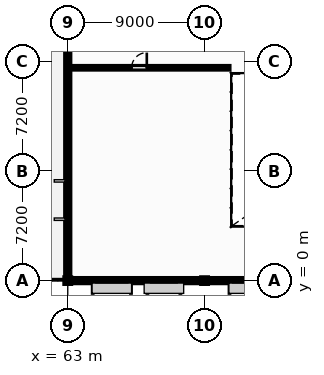
"""IFC4 building model, lengths in metres.
Left out: names, types, materials, properties, quantities, classifications, styles, units other than length and angle.
Written with IfcOpenShell. Run it as: python <this file> out.ifc"""

import sys

from ifc_helpers import new_model, si_unit, direction, frame, frame_2d, origin, origin_2d, place, context, subcontext, project, spatial, polyline, rectangle, i_section, outline, extrude, element, fill, save


model = new_model("IFC4")
c1 = context("Model", 3, precision=1e-05, world=origin(), true_north=direction((0.0, 1.0)))
c2 = subcontext(c1, "Body", "Model", "MODEL_VIEW")
j1 = project(units=[si_unit("LENGTHUNIT", "METRE"), si_unit("PLANEANGLEUNIT", "RADIAN")], contexts=[c1])
p1 = place(None, origin())
s1 = spatial("IfcSite", under=j1, at=p1, CompositionType="ELEMENT")
p2 = place(p1, origin())
s2 = spatial("IfcBuilding", under=s1, at=p2, CompositionType="ELEMENT")
p3 = place(p2, frame((0.0, 0.0, 5.1)))
s3 = spatial("IfcBuildingStorey", under=s2, at=p3, CompositionType="ELEMENT", Elevation=5.1)
for number, where, z_axis, x_axis in (
    (1, (63.0, 0.0, 0.0), (0.0, 0.0, 1.0), (1.0, 0.0, 0.0)),
    (2, (72.0, 0.0, 0.0), (0.0, 0.0, 1.0), (1.0, 0.0, 0.0)),
):
    element("IfcColumn", number, at=place(p3, frame(where, z_axis=z_axis, x_axis=x_axis)), inside=s3, PredefinedType="COLUMN", context=c2, shape_type="SweptSolid", body=[
        extrude(i_section(OverallWidth=0.368, OverallDepth=0.356, WebThickness=0.011, FlangeThickness=0.018, at=origin_2d()), origin(), (0.0, 0.0, 1.0), 3.84),
    ])
p4 = place(p3, frame((63.0, 0.0, 0.0), z_axis=(0.0, 0.0, 1.0), x_axis=(1.0, 0.0, 0.0)))
e3 = element("IfcWall", 3, at=p4, inside=s3, PredefinedType="SOLIDWALL", context=c2, shape_type="SweptSolid", body=[
    extrude(rectangle(XDim=9.0, YDim=0.26, at=frame_2d((4.5, 0.0))), origin(), (0.0, 0.0, 1.0), 6.331),
])
p5 = place(p4, frame((1.8, 0.0, 0.65)))
e4 = element("IfcOpeningElement", 4, at=p5, cuts=e3, PredefinedType="OPENING", context=c2, shape_type="SweptSolid", body=[
    extrude(rectangle(XDim=2.2, YDim=1.95, at=frame_2d((1.1, 0.975))), frame((0.0, 0.14, 0.0), z_axis=(0.0, -1.0, 0.0), x_axis=(1.0, 0.0, 0.0)), (0.0, 0.0, 1.0), 0.28),
])
p6 = place(p4, frame((5.4, 0.0, 0.65)))
e5 = element("IfcOpeningElement", 5, at=p6, cuts=e3, PredefinedType="OPENING", context=c2, shape_type="SweptSolid", body=[
    extrude(rectangle(XDim=1.85, YDim=1.75, at=frame_2d((0.925, 0.875))), frame((0.0, 0.14, 0.0), z_axis=(0.0, -1.0, 0.0), x_axis=(1.0, 0.0, 0.0)), (0.0, 0.0, 1.0), 0.28),
])
p7 = place(p3, frame((72.0, 0.0, 0.0), z_axis=(0.0, 0.0, 1.0), x_axis=(1.0, 0.0, 0.0)))
e6 = element("IfcWall", 6, at=p7, inside=s3, PredefinedType="SOLIDWALL", context=c2, shape_type="SweptSolid", body=[
    extrude(rectangle(XDim=9.0, YDim=0.26, at=frame_2d((4.5, 0.0))), origin(), (0.0, 0.0, 1.0), 6.331),
])
p8 = place(p7, frame((1.8, 0.0, 0.65)))
e7 = element("IfcOpeningElement", 7, at=p8, cuts=e6, PredefinedType="OPENING", context=c2, shape_type="SweptSolid", body=[
    extrude(rectangle(XDim=2.2, YDim=1.95, at=frame_2d((1.1, 0.975))), frame((0.0, 0.14, 0.0), z_axis=(0.0, -1.0, 0.0), x_axis=(1.0, 0.0, 0.0)), (0.0, 0.0, 1.0), 0.28),
])
p9 = place(p7, frame((5.4, 0.0, 0.65)))
e8 = element("IfcOpeningElement", 8, at=p9, cuts=e6, PredefinedType="OPENING", context=c2, shape_type="SweptSolid", body=[
    extrude(rectangle(XDim=1.85, YDim=1.75, at=frame_2d((0.925, 0.875))), frame((0.0, 0.14, 0.0), z_axis=(0.0, -1.0, 0.0), x_axis=(1.0, 0.0, 0.0)), (0.0, 0.0, 1.0), 0.28),
])
p10 = place(p3, frame((63.0, 0.0, 0.0), z_axis=(0.0, 0.0, 1.0), x_axis=(0.0, 1.0, 0.0)))
e9 = element("IfcWall", 9, at=p10, inside=s3, PredefinedType="SOLIDWALL", context=c2, shape_type="SweptSolid", body=[
    extrude(outline(polyline([(0.0, 0.0), (21.6, 0.0), (21.6, 7.297), (10.8, 4.2), (0.0, 7.297), (0.0, 0.0)])), frame((0.0, 0.13, 0.0), z_axis=(0.0, -1.0, 0.0), x_axis=(1.0, 0.0, 0.0)), (0.0, 0.0, 1.0), 0.26),
])
p11 = place(p10, frame((15.2, 0.0, 0.0)))
e10 = element("IfcOpeningElement", 10, at=p11, cuts=e9, PredefinedType="OPENING", context=c2, shape_type="SweptSolid", body=[
    extrude(rectangle(XDim=1.6, YDim=2.25, at=frame_2d((0.8, 1.125))), frame((0.0, 0.14, 0.0), z_axis=(0.0, -1.0, 0.0), x_axis=(1.0, 0.0, 0.0)), (0.0, 0.0, 1.0), 0.28),
])
p12 = place(p10, frame((4.2, 0.0, 0.85)))
e11 = element("IfcOpeningElement", 11, at=p12, cuts=e9, PredefinedType="OPENING", context=c2, shape_type="SweptSolid", body=[
    extrude(rectangle(XDim=2.2, YDim=1.95, at=frame_2d((1.1, 0.975))), frame((0.0, 0.14, 0.0), z_axis=(0.0, -1.0, 0.0), x_axis=(1.0, 0.0, 0.0)), (0.0, 0.0, 1.0), 0.28),
])
p13 = place(p3, frame((63.0, 14.0, 0.0), z_axis=(0.0, 0.0, 1.0), x_axis=(1.0, 0.0, 0.0)))
e12 = element("IfcWall", 12, at=p13, inside=s3, PredefinedType="PARTITIONING", context=c2, shape_type="SweptSolid", body=[
    extrude(rectangle(XDim=10.6, YDim=0.16, at=frame_2d((5.3, 0.0))), origin(), (0.0, 0.0, 1.0), 3.55),
])
p14 = place(p13, frame((4.2, 0.0, 0.0)))
e13 = element("IfcOpeningElement", 13, at=p14, cuts=e12, PredefinedType="OPENING", context=c2, shape_type="SweptSolid", body=[
    extrude(rectangle(XDim=1.0, YDim=2.15, at=frame_2d((0.5, 1.075))), frame((0.0, 0.09, 0.0), z_axis=(0.0, -1.0, 0.0), x_axis=(1.0, 0.0, 0.0)), (0.0, 0.0, 1.0), 0.18),
])
p15 = place(p5, origin())
e14 = element("IfcWindow", 14, at=p15, inside=s3, PartitioningType="SINGLE_PANEL", PredefinedType="WINDOW", context=c2, shape_type="SweptSolid", body=[
    extrude(rectangle(XDim=2.2, YDim=1.95, at=frame_2d((1.1, 0.975))), frame((0.0, 0.03, 0.0), z_axis=(0.0, -1.0, 0.0), x_axis=(1.0, 0.0, 0.0)), (0.0, 0.0, 1.0), 0.06),
])
fill(e4, e14)
p16 = place(p6, origin())
e15 = element("IfcWindow", 15, at=p16, inside=s3, PartitioningType="SINGLE_PANEL", PredefinedType="WINDOW", context=c2, shape_type="SweptSolid", body=[
    extrude(rectangle(XDim=1.85, YDim=1.75, at=frame_2d((0.925, 0.875))), frame((0.0, 0.03, 0.0), z_axis=(0.0, -1.0, 0.0), x_axis=(1.0, 0.0, 0.0)), (0.0, 0.0, 1.0), 0.06),
])
fill(e5, e15)
p17 = place(p8, origin())
e16 = element("IfcWindow", 16, at=p17, inside=s3, PartitioningType="SINGLE_PANEL", PredefinedType="WINDOW", context=c2, shape_type="SweptSolid", body=[
    extrude(rectangle(XDim=2.2, YDim=1.95, at=frame_2d((1.1, 0.975))), frame((0.0, 0.03, 0.0), z_axis=(0.0, -1.0, 0.0), x_axis=(1.0, 0.0, 0.0)), (0.0, 0.0, 1.0), 0.06),
])
fill(e7, e16)
p18 = place(p12, origin())
e17 = element("IfcWindow", 17, at=p18, inside=s3, PartitioningType="SINGLE_PANEL", PredefinedType="WINDOW", context=c2, shape_type="SweptSolid", body=[
    extrude(rectangle(XDim=2.2, YDim=1.95, at=frame_2d((1.1, 0.975))), frame((0.0, 0.03, 0.0), z_axis=(0.0, -1.0, 0.0), x_axis=(1.0, 0.0, 0.0)), (0.0, 0.0, 1.0), 0.06),
])
fill(e11, e17)
p19 = place(p14, origin())
e18 = element("IfcDoor", 18, at=p19, inside=s3, OperationType="SINGLE_SWING_RIGHT", PredefinedType="DOOR", context=c2, shape_type="SweptSolid", body=[
    extrude(rectangle(XDim=1.0, YDim=2.15, at=frame_2d((0.5, 1.075))), frame((0.0, 0.025, 0.0), z_axis=(0.0, -1.0, 0.0), x_axis=(1.0, 0.0, 0.0)), (0.0, 0.0, 1.0), 0.05),
])
fill(e13, e18)
save(model, sys.argv[1])
